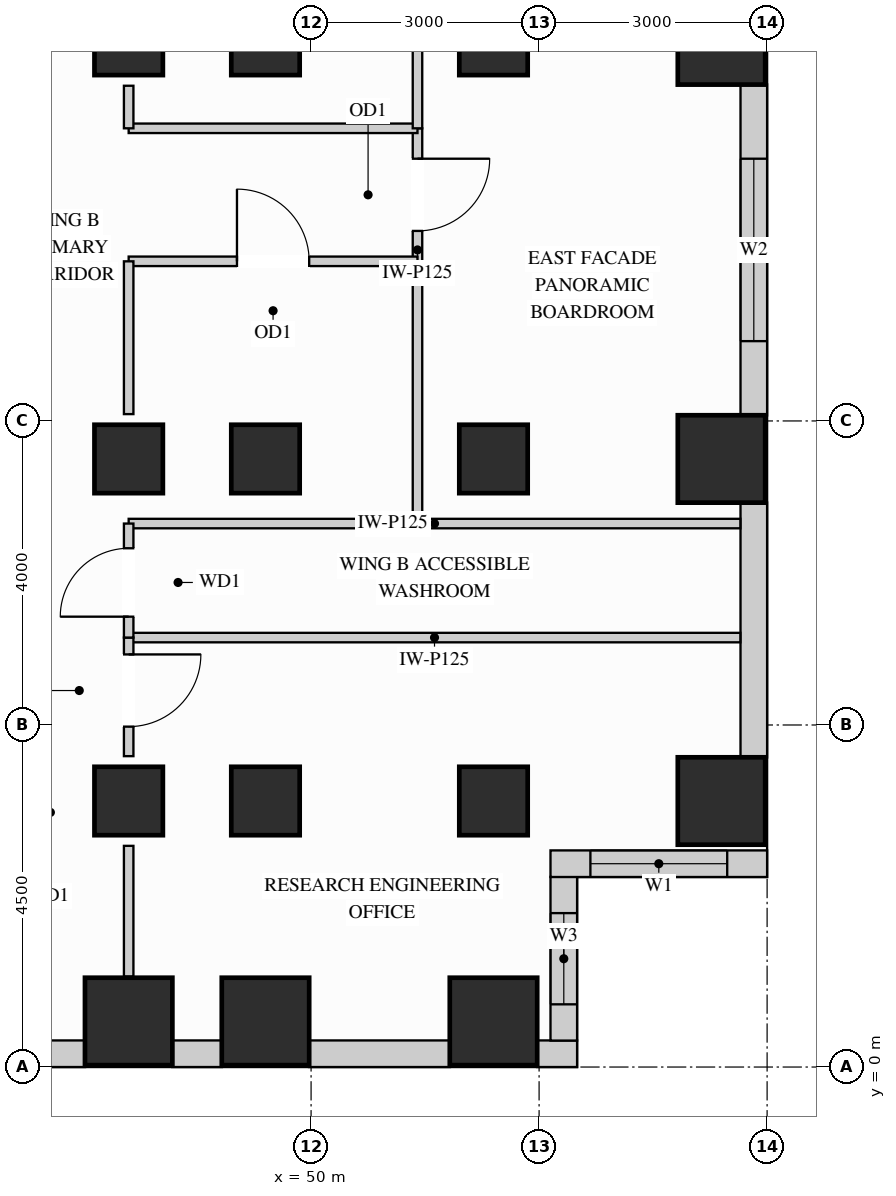
"""IFC4 building model, lengths in metres.
Left out: names, types, materials, properties, quantities, classifications, styles, units other than length and angle.
Written with IfcOpenShell. Run it as: python <this file> out.ifc"""

import sys

from ifc_helpers import new_model, si_unit, direction, frame, frame_2d, origin, origin_2d, place, context, subcontext, project, spatial, rectangle, extrude, source, transform, mapped, element, fill, save


model = new_model("IFC4")
c1 = context("Model", 3, precision=1e-05, world=origin(), true_north=direction((0.0, 1.0)))
c2 = subcontext(c1, "Body", "Model", "MODEL_VIEW")
j1 = project(units=[si_unit("LENGTHUNIT", "METRE"), si_unit("PLANEANGLEUNIT", "RADIAN")], contexts=[c1])
p1 = place(None, origin())
s1 = spatial("IfcSite", under=j1, at=p1, CompositionType="ELEMENT")
p2 = place(p1, origin())
s2 = spatial("IfcBuilding", under=s1, at=p2, CompositionType="ELEMENT")
p3 = place(p2, frame((0.0, 0.0, 120.6)))
s3 = spatial("IfcBuildingStorey", under=s2, at=p3, CompositionType="ELEMENT", Elevation=120.6)
m1 = source(origin(), c2, "Body", "SweptSolid", [
    extrude(rectangle(XDim=0.9, YDim=0.9, at=origin_2d()), origin(), (0.0, 0.0, 1.0), 3.38),
])
for number, where, z_axis, x_axis in (
    (1, (47.6, 13.5, 0.0), (0.0, 0.0, 1.0), (1.0, 0.0, 0.0)),
    (2, (47.6, 3.5, 0.0), (0.0, 0.0, 1.0), (1.0, 0.0, 0.0)),
    (3, (47.6, 8.0, 0.0), (0.0, 0.0, 1.0), (1.0, 0.0, 0.0)),
    (4, (49.4, 13.5, 0.0), (0.0, 0.0, 1.0), (1.0, 0.0, 0.0)),
    (5, (49.4, 3.5, 0.0), (0.0, 0.0, 1.0), (1.0, 0.0, 0.0)),
    (6, (49.4, 8.0, 0.0), (0.0, 0.0, 1.0), (1.0, 0.0, 0.0)),
    (7, (52.4, 13.5, 0.0), (0.0, 0.0, 1.0), (1.0, 0.0, 0.0)),
    (8, (52.4, 3.5, 0.0), (0.0, 0.0, 1.0), (1.0, 0.0, 0.0)),
    (9, (52.4, 8.0, 0.0), (0.0, 0.0, 1.0), (1.0, 0.0, 0.0)),
):
    element("IfcColumn", number, at=place(p3, frame(where, z_axis=z_axis, x_axis=x_axis)), inside=s3, PredefinedType="COLUMN", context=c2, shape_type="MappedRepresentation", body=[
        mapped(m1, transform((0.0, 0.0, 0.0), x_axis=(1.0, 0.0, 0.0), y_axis=(0.0, 1.0, 0.0), z_axis=(0.0, 0.0, 1.0))),
    ])
m2 = source(origin(), c2, "Body", "SweptSolid", [
    extrude(rectangle(XDim=1.15, YDim=1.15, at=origin_2d()), origin(), (0.0, 0.0, 1.0), 3.38),
])
for number, where, z_axis, x_axis in (
    (10, (55.4, 13.5, 0.0), (0.0, 0.0, 1.0), (1.0, 0.0, 0.0)),
    (11, (55.4, 3.5, 0.0), (0.0, 0.0, 1.0), (1.0, 0.0, 0.0)),
    (12, (55.4, 8.0, 0.0), (0.0, 0.0, 1.0), (1.0, 0.0, 0.0)),
    (13, (47.6, 0.6, 0.0), (0.0, 0.0, 1.0), (1.0, 0.0, 0.0)),
    (14, (49.4, 0.6, 0.0), (0.0, 0.0, 1.0), (1.0, 0.0, 0.0)),
    (15, (52.4, 0.6, 0.0), (0.0, 0.0, 1.0), (1.0, 0.0, 0.0)),
):
    element("IfcColumn", number, at=place(p3, frame(where, z_axis=z_axis, x_axis=x_axis)), inside=s3, PredefinedType="COLUMN", context=c2, shape_type="MappedRepresentation", body=[
        mapped(m2, transform((0.0, 0.0, 0.0), x_axis=(1.0, 0.0, 0.0), y_axis=(0.0, 1.0, 0.0), z_axis=(0.0, 0.0, 1.0))),
    ])
p4 = place(p3, frame((40.573, 0.175, 0.0), z_axis=(0.0, 0.0, 1.0), x_axis=(1.0, 0.0, 0.0)))
e16 = element("IfcWall", 16, at=p4, inside=s3, PredefinedType="SOLIDWALL", context=c2, shape_type="SweptSolid", body=[
    extrude(rectangle(XDim=6.454, YDim=0.35, at=frame_2d((3.227, 0.0))), origin(), (0.0, 0.0, 1.0), 3.365),
])
p5 = place(p4, frame((0.712, 0.0, 0.78)))
e17 = element("IfcOpeningElement", 17, at=p5, cuts=e16, PredefinedType="OPENING", context=c2, shape_type="SweptSolid", body=[
    extrude(rectangle(XDim=1.8, YDim=2.1, at=frame_2d((0.9, 1.05))), frame((0.0, 0.185, 0.0), z_axis=(0.0, -1.0, 0.0), x_axis=(1.0, 0.0, 0.0)), (0.0, 0.0, 1.0), 0.37),
])
p6 = place(p4, frame((2.905, 0.0, 0.78)))
e18 = element("IfcOpeningElement", 18, at=p6, cuts=e16, PredefinedType="OPENING", context=c2, shape_type="SweptSolid", body=[
    extrude(rectangle(XDim=1.8, YDim=2.1, at=frame_2d((0.9, 1.05))), frame((0.0, 0.185, 0.0), z_axis=(0.0, -1.0, 0.0), x_axis=(1.0, 0.0, 0.0)), (0.0, 0.0, 1.0), 0.37),
])
m3 = source(origin(), c2, "Body", "SweptSolid", [
    extrude(rectangle(XDim=0.654, YDim=0.35, at=frame_2d((0.327, 0.0))), origin(), (0.0, 0.0, 1.0), 3.365),
])
p7 = place(p3, frame((48.173, 0.175, 0.0), z_axis=(0.0, 0.0, 1.0), x_axis=(1.0, 0.0, 0.0)))
e19 = element("IfcWall", 19, at=p7, inside=s3, PredefinedType="SOLIDWALL", context=c2, shape_type="MappedRepresentation", body=[
    mapped(m3, transform((0.0, 0.0, 0.0), x_axis=(1.0, 0.0, 0.0), y_axis=(0.0, 1.0, 0.0), z_axis=(0.0, 0.0, 1.0))),
])
m4 = source(origin(), c2, "Body", "SweptSolid", [
    extrude(rectangle(XDim=1.854, YDim=0.35, at=frame_2d((0.927, 0.0))), origin(), (0.0, 0.0, 1.0), 3.365),
])
p8 = place(p3, frame((49.973, 0.175, 0.0), z_axis=(0.0, 0.0, 1.0), x_axis=(1.0, 0.0, 0.0)))
e20 = element("IfcWall", 20, at=p8, inside=s3, PredefinedType="SOLIDWALL", context=c2, shape_type="MappedRepresentation", body=[
    mapped(m4, transform((0.0, 0.0, 0.0), x_axis=(1.0, 0.0, 0.0), y_axis=(0.0, 1.0, 0.0), z_axis=(0.0, 0.0, 1.0))),
])
m5 = source(origin(), c2, "Body", "SweptSolid", [
    extrude(rectangle(XDim=0.527, YDim=0.35, at=frame_2d((0.264, 0.0))), origin(), (0.0, 0.0, 1.0), 3.365),
])
p9 = place(p3, frame((52.973, 0.175, 0.0), z_axis=(0.0, 0.0, 1.0), x_axis=(1.0, 0.0, 0.0)))
e21 = element("IfcWall", 21, at=p9, inside=s3, PredefinedType="SOLIDWALL", context=c2, shape_type="MappedRepresentation", body=[
    mapped(m5, transform((0.0, 0.0, 0.0), x_axis=(1.0, 0.0, 0.0), y_axis=(0.0, 1.0, 0.0), z_axis=(0.0, 0.0, 1.0))),
])
p10 = place(p3, frame((53.325, 0.348, 0.0), z_axis=(0.0, 0.0, 1.0), x_axis=(0.0, 1.0, 0.0)))
e22 = element("IfcWall", 22, at=p10, inside=s3, PredefinedType="SOLIDWALL", context=c2, shape_type="SweptSolid", body=[
    extrude(rectangle(XDim=2.154, YDim=0.35, at=frame_2d((1.077, 0.0))), origin(), (0.0, 0.0, 1.0), 3.365),
])
p11 = place(p10, frame((0.477, 0.0, 0.78)))
e23 = element("IfcOpeningElement", 23, at=p11, cuts=e22, PredefinedType="OPENING", context=c2, shape_type="SweptSolid", body=[
    extrude(rectangle(XDim=1.2, YDim=2.1, at=frame_2d((0.6, 1.05))), frame((0.0, 0.185, 0.0), z_axis=(0.0, -1.0, 0.0), x_axis=(1.0, 0.0, 0.0)), (0.0, 0.0, 1.0), 0.37),
])
p12 = place(p3, frame((53.15, 2.675, 0.0), z_axis=(0.0, 0.0, 1.0), x_axis=(1.0, 0.0, 0.0)))
e24 = element("IfcWall", 24, at=p12, inside=s3, PredefinedType="SOLIDWALL", context=c2, shape_type="SweptSolid", body=[
    extrude(rectangle(XDim=2.85, YDim=0.35, at=frame_2d((1.425, 0.0))), origin(), (0.0, 0.0, 1.0), 3.365),
])
p13 = place(p12, frame((0.525, 0.0, 0.78)))
e25 = element("IfcOpeningElement", 25, at=p13, cuts=e24, PredefinedType="OPENING", context=c2, shape_type="SweptSolid", body=[
    extrude(rectangle(XDim=1.8, YDim=2.1, at=frame_2d((0.9, 1.05))), frame((0.0, 0.185, 0.0), z_axis=(0.0, -1.0, 0.0), x_axis=(1.0, 0.0, 0.0)), (0.0, 0.0, 1.0), 0.37),
])
m6 = source(origin(), c2, "Body", "SweptSolid", [
    extrude(rectangle(XDim=3.354, YDim=0.35, at=frame_2d((1.677, 0.0))), origin(), (0.0, 0.0, 1.0), 3.365),
])
p14 = place(p3, frame((55.825, 4.073, 0.0), z_axis=(0.0, 0.0, 1.0), x_axis=(0.0, 1.0, 0.0)))
e26 = element("IfcWall", 26, at=p14, inside=s3, PredefinedType="SOLIDWALL", context=c2, shape_type="MappedRepresentation", body=[
    mapped(m6, transform((0.0, 0.0, 0.0), x_axis=(1.0, 0.0, 0.0), y_axis=(0.0, 1.0, 0.0), z_axis=(0.0, 0.0, 1.0))),
])
p15 = place(p3, frame((55.825, 8.573, 0.0), z_axis=(0.0, 0.0, 1.0), x_axis=(0.0, 1.0, 0.0)))
e27 = element("IfcWall", 27, at=p15, inside=s3, PredefinedType="SOLIDWALL", context=c2, shape_type="SweptSolid", body=[
    extrude(rectangle(XDim=4.354, YDim=0.35, at=frame_2d((2.177, 0.0))), origin(), (0.0, 0.0, 1.0), 3.365),
])
p16 = place(p15, frame((0.977, 0.0, 0.78)))
e28 = element("IfcOpeningElement", 28, at=p16, cuts=e27, PredefinedType="OPENING", context=c2, shape_type="SweptSolid", body=[
    extrude(rectangle(XDim=2.4, YDim=2.1, at=frame_2d((1.2, 1.05))), frame((0.0, 0.185, 0.0), z_axis=(0.0, -1.0, 0.0), x_axis=(1.0, 0.0, 0.0)), (0.0, 0.0, 1.0), 0.37),
])
p17 = place(p3, frame((51.4, 10.6, 0.0), z_axis=(0.0, 0.0, 1.0), x_axis=(0.0, 1.0, 0.0)))
e29 = element("IfcWall", 29, at=p17, inside=s3, PredefinedType="PARTITIONING", context=c2, shape_type="SweptSolid", body=[
    extrude(rectangle(XDim=1.75, YDim=0.125, at=frame_2d((0.875, 0.0))), origin(), (0.0, 0.0, 1.0), 3.365),
])
p18 = place(p17, frame((0.4, 0.0, 0.0)))
e30 = element("IfcOpeningElement", 30, at=p18, cuts=e29, PredefinedType="OPENING", context=c2, shape_type="SweptSolid", body=[
    extrude(rectangle(XDim=0.95, YDim=2.15, at=frame_2d((0.475, 1.075))), frame((0.0, 0.073, 0.0), z_axis=(0.0, -1.0, 0.0), x_axis=(1.0, 0.0, 0.0)), (0.0, 0.0, 1.0), 0.145),
])
m7 = source(origin(), c2, "Body", "SweptSolid", [
    extrude(rectangle(XDim=8.048, YDim=0.125, at=frame_2d((4.024, 0.0))), origin(), (0.0, 0.0, 1.0), 3.365),
])
for number, where, z_axis, x_axis in (
    (31, (47.6, 5.65, 0.0), (0.0, 0.0, 1.0), (1.0, 0.0, 0.0)),
    (32, (47.6, 7.15, 0.0), (0.0, 0.0, 1.0), (1.0, 0.0, 0.0)),
):
    element("IfcWall", number, at=place(p3, frame(where, z_axis=z_axis, x_axis=x_axis)), inside=s3, PredefinedType="PARTITIONING", context=c2, shape_type="MappedRepresentation", body=[
        mapped(m7, transform((0.0, 0.0, 0.0), x_axis=(1.0, 0.0, 0.0), y_axis=(0.0, 1.0, 0.0), z_axis=(0.0, 0.0, 1.0))),
    ])
m8 = source(origin(), c2, "Body", "SweptSolid", [
    extrude(rectangle(XDim=3.8, YDim=0.125, at=frame_2d((1.9, 0.0))), origin(), (0.0, 0.0, 1.0), 3.365),
])
p19 = place(p3, frame((47.6, 12.35, 0.0), z_axis=(0.0, 0.0, 1.0), x_axis=(1.0, 0.0, 0.0)))
e33 = element("IfcWall", 33, at=p19, inside=s3, PredefinedType="PARTITIONING", context=c2, shape_type="MappedRepresentation", body=[
    mapped(m8, transform((0.0, 0.0, 0.0), x_axis=(1.0, 0.0, 0.0), y_axis=(0.0, 1.0, 0.0), z_axis=(0.0, 0.0, 1.0))),
])
p20 = place(p3, frame((47.6, 10.6, 0.0), z_axis=(0.0, 0.0, 1.0), x_axis=(1.0, 0.0, 0.0)))
e34 = element("IfcWall", 34, at=p20, inside=s3, PredefinedType="PARTITIONING", context=c2, shape_type="SweptSolid", body=[
    extrude(rectangle(XDim=3.8, YDim=0.125, at=frame_2d((1.9, 0.0))), origin(), (0.0, 0.0, 1.0), 2.677),
])
p21 = place(p20, frame((1.425, 0.0, 0.0)))
e35 = element("IfcOpeningElement", 35, at=p21, cuts=e34, PredefinedType="OPENING", context=c2, shape_type="SweptSolid", body=[
    extrude(rectangle(XDim=0.95, YDim=2.15, at=frame_2d((0.475, 1.075))), frame((0.0, 0.073, 0.0), z_axis=(0.0, -1.0, 0.0), x_axis=(1.0, 0.0, 0.0)), (0.0, 0.0, 1.0), 0.145),
])
m9 = source(origin(), c2, "Body", "SweptSolid", [
    extrude(rectangle(XDim=3.45, YDim=0.125, at=frame_2d((1.725, 0.0))), origin(), (0.0, 0.0, 1.0), 3.365),
])
p22 = place(p3, frame((51.4, 7.15, 0.0), z_axis=(0.0, 0.0, 1.0), x_axis=(0.0, 1.0, 0.0)))
e36 = element("IfcWall", 36, at=p22, inside=s3, PredefinedType="PARTITIONING", context=c2, shape_type="MappedRepresentation", body=[
    mapped(m9, transform((0.0, 0.0, 0.0), x_axis=(1.0, 0.0, 0.0), y_axis=(0.0, 1.0, 0.0), z_axis=(0.0, 0.0, 1.0))),
])
m10 = source(origin(), c2, "Body", "SweptSolid", [
    extrude(rectangle(XDim=9.79, YDim=0.125, at=frame_2d((4.895, 0.0))), origin(), (0.0, 0.0, 1.0), 3.365),
])
p23 = place(p3, frame((51.4, 12.35, 0.0), z_axis=(0.0, 0.0, 1.0), x_axis=(0.0, 1.0, 0.0)))
e37 = element("IfcWall", 37, at=p23, inside=s3, PredefinedType="PARTITIONING", context=c2, shape_type="MappedRepresentation", body=[
    mapped(m10, transform((0.0, 0.0, 0.0), x_axis=(1.0, 0.0, 0.0), y_axis=(0.0, 1.0, 0.0), z_axis=(0.0, 0.0, 1.0))),
])
p24 = place(p3, frame((47.6, 4.09, 0.0), z_axis=(0.0, 0.0, 1.0), x_axis=(0.0, 1.0, 0.0)))
e38 = element("IfcWall", 38, at=p24, inside=s3, PredefinedType="PARTITIONING", context=c2, shape_type="SweptSolid", body=[
    extrude(rectangle(XDim=1.56, YDim=0.125, at=frame_2d((0.78, 0.0))), origin(), (0.0, 0.0, 1.0), 2.677),
])
p25 = place(p24, frame((0.388, 0.0, 0.0)))
e39 = element("IfcOpeningElement", 39, at=p25, cuts=e38, PredefinedType="OPENING", context=c2, shape_type="SweptSolid", body=[
    extrude(rectangle(XDim=0.95, YDim=2.15, at=frame_2d((0.475, 1.075))), frame((0.0, 0.073, 0.0), z_axis=(0.0, -1.0, 0.0), x_axis=(1.0, 0.0, 0.0)), (0.0, 0.0, 1.0), 0.145),
])
m11 = source(origin(), c2, "Body", "SweptSolid", [
    extrude(rectangle(XDim=1.72, YDim=0.125, at=frame_2d((0.86, 0.0))), origin(), (0.0, 0.0, 1.0), 2.677),
])
p26 = place(p3, frame((47.6, 1.19, 0.0), z_axis=(0.0, 0.0, 1.0), x_axis=(0.0, 1.0, 0.0)))
e40 = element("IfcWall", 40, at=p26, inside=s3, PredefinedType="PARTITIONING", context=c2, shape_type="MappedRepresentation", body=[
    mapped(m11, transform((0.0, 0.0, 0.0), x_axis=(1.0, 0.0, 0.0), y_axis=(0.0, 1.0, 0.0), z_axis=(0.0, 0.0, 1.0))),
])
m12 = source(origin(), c2, "Body", "SweptSolid", [
    extrude(rectangle(XDim=2.01, YDim=0.125, at=frame_2d((1.005, 0.0))), origin(), (0.0, 0.0, 1.0), 2.677),
])
p27 = place(p3, frame((47.6, 8.59, 0.0), z_axis=(0.0, 0.0, 1.0), x_axis=(0.0, 1.0, 0.0)))
e41 = element("IfcWall", 41, at=p27, inside=s3, PredefinedType="PARTITIONING", context=c2, shape_type="MappedRepresentation", body=[
    mapped(m12, transform((0.0, 0.0, 0.0), x_axis=(1.0, 0.0, 0.0), y_axis=(0.0, 1.0, 0.0), z_axis=(0.0, 0.0, 1.0))),
])
m13 = source(origin(), c2, "Body", "SweptSolid", [
    extrude(rectangle(XDim=0.56, YDim=0.125, at=frame_2d((0.28, 0.0))), origin(), (0.0, 0.0, 1.0), 2.677),
])
p28 = place(p3, frame((47.6, 12.35, 0.0), z_axis=(0.0, 0.0, 1.0), x_axis=(0.0, 1.0, 0.0)))
e42 = element("IfcWall", 42, at=p28, inside=s3, PredefinedType="PARTITIONING", context=c2, shape_type="MappedRepresentation", body=[
    mapped(m13, transform((0.0, 0.0, 0.0), x_axis=(1.0, 0.0, 0.0), y_axis=(0.0, 1.0, 0.0), z_axis=(0.0, 0.0, 1.0))),
])
p29 = place(p3, frame((47.6, 5.65, 0.0), z_axis=(0.0, 0.0, 1.0), x_axis=(0.0, 1.0, 0.0)))
e43 = element("IfcWall", 43, at=p29, inside=s3, PredefinedType="PARTITIONING", context=c2, shape_type="SweptSolid", body=[
    extrude(rectangle(XDim=1.5, YDim=0.125, at=frame_2d((0.75, 0.0))), origin(), (0.0, 0.0, 1.0), 2.677),
])
p30 = place(p29, frame((0.275, 0.0, 0.0)))
e44 = element("IfcOpeningElement", 44, at=p30, cuts=e43, PredefinedType="OPENING", context=c2, shape_type="SweptSolid", body=[
    extrude(rectangle(XDim=0.9, YDim=2.15, at=frame_2d((0.45, 1.075))), frame((0.0, 0.073, 0.0), z_axis=(0.0, -1.0, 0.0), x_axis=(1.0, 0.0, 0.0)), (0.0, 0.0, 1.0), 0.145),
])
m14 = source(origin(), c2, "Body", "SweptSolid", [
    extrude(rectangle(XDim=0.95, YDim=2.15, at=frame_2d((0.475, 1.075))), frame((0.0, 0.025, 0.0), z_axis=(0.0, -1.0, 0.0), x_axis=(1.0, 0.0, 0.0)), (0.0, 0.0, 1.0), 0.05),
])
p31 = place(p25, origin())
e45 = element("IfcDoor", 45, at=p31, inside=s3, OperationType="SINGLE_SWING_RIGHT", PredefinedType="DOOR", context=c2, shape_type="MappedRepresentation", body=[
    mapped(m14, transform((0.0, 0.0, 0.0), x_axis=(1.0, 0.0, 0.0), y_axis=(0.0, 1.0, 0.0), z_axis=(0.0, 0.0, 1.0))),
])
fill(e39, e45)
p32 = place(p21, origin())
e46 = element("IfcDoor", 46, at=p32, inside=s3, OperationType="SINGLE_SWING_LEFT", PredefinedType="DOOR", context=c2, shape_type="MappedRepresentation", body=[
    mapped(m14, transform((0.0, 0.0, 0.0), x_axis=(1.0, 0.0, 0.0), y_axis=(0.0, 1.0, 0.0), z_axis=(0.0, 0.0, 1.0))),
])
fill(e35, e46)
p33 = place(p18, origin())
e47 = element("IfcDoor", 47, at=p33, inside=s3, OperationType="SINGLE_SWING_RIGHT", PredefinedType="DOOR", context=c2, shape_type="MappedRepresentation", body=[
    mapped(m14, transform((0.0, 0.0, 0.0), x_axis=(1.0, 0.0, 0.0), y_axis=(0.0, 1.0, 0.0), z_axis=(0.0, 0.0, 1.0))),
])
fill(e30, e47)
m15 = source(origin(), c2, "Body", "SweptSolid", [
    extrude(rectangle(XDim=0.9, YDim=2.15, at=frame_2d((0.45, 1.075))), frame((0.0, 0.025, 0.0), z_axis=(0.0, -1.0, 0.0), x_axis=(1.0, 0.0, 0.0)), (0.0, 0.0, 1.0), 0.05),
])
p34 = place(p30, origin())
e48 = element("IfcDoor", 48, at=p34, inside=s3, OperationType="SINGLE_SWING_LEFT", PredefinedType="DOOR", context=c2, shape_type="MappedRepresentation", body=[
    mapped(m15, transform((0.0, 0.0, 0.0), x_axis=(1.0, 0.0, 0.0), y_axis=(0.0, 1.0, 0.0), z_axis=(0.0, 0.0, 1.0))),
])
fill(e44, e48)
m16 = source(origin(), c2, "Body", "SweptSolid", [
    extrude(rectangle(XDim=1.8, YDim=2.1, at=frame_2d((0.9, 1.05))), frame((0.0, 0.03, 0.0), z_axis=(0.0, -1.0, 0.0), x_axis=(1.0, 0.0, 0.0)), (0.0, 0.0, 1.0), 0.06),
])
p35 = place(p13, origin())
e49 = element("IfcWindow", 49, at=p35, inside=s3, PartitioningType="SINGLE_PANEL", PredefinedType="WINDOW", context=c2, shape_type="MappedRepresentation", body=[
    mapped(m16, transform((0.0, 0.0, 0.0), x_axis=(1.0, 0.0, 0.0), y_axis=(0.0, 1.0, 0.0), z_axis=(0.0, 0.0, 1.0))),
])
fill(e25, e49)
m17 = source(origin(), c2, "Body", "SweptSolid", [
    extrude(rectangle(XDim=2.4, YDim=2.1, at=frame_2d((1.2, 1.05))), frame((0.0, 0.03, 0.0), z_axis=(0.0, -1.0, 0.0), x_axis=(1.0, 0.0, 0.0)), (0.0, 0.0, 1.0), 0.06),
])
p36 = place(p16, origin())
e50 = element("IfcWindow", 50, at=p36, inside=s3, PartitioningType="SINGLE_PANEL", PredefinedType="WINDOW", context=c2, shape_type="MappedRepresentation", body=[
    mapped(m17, transform((0.0, 0.0, 0.0), x_axis=(1.0, 0.0, 0.0), y_axis=(0.0, 1.0, 0.0), z_axis=(0.0, 0.0, 1.0))),
])
fill(e28, e50)
m18 = source(origin(), c2, "Body", "SweptSolid", [
    extrude(rectangle(XDim=1.2, YDim=2.1, at=frame_2d((0.6, 1.05))), frame((0.0, 0.03, 0.0), z_axis=(0.0, -1.0, 0.0), x_axis=(1.0, 0.0, 0.0)), (0.0, 0.0, 1.0), 0.06),
])
p37 = place(p11, origin())
e51 = element("IfcWindow", 51, at=p37, inside=s3, PartitioningType="SINGLE_PANEL", PredefinedType="WINDOW", context=c2, shape_type="MappedRepresentation", body=[
    mapped(m18, transform((0.0, 0.0, 0.0), x_axis=(1.0, 0.0, 0.0), y_axis=(0.0, 1.0, 0.0), z_axis=(0.0, 0.0, 1.0))),
])
fill(e23, e51)
save(model, sys.argv[1])
